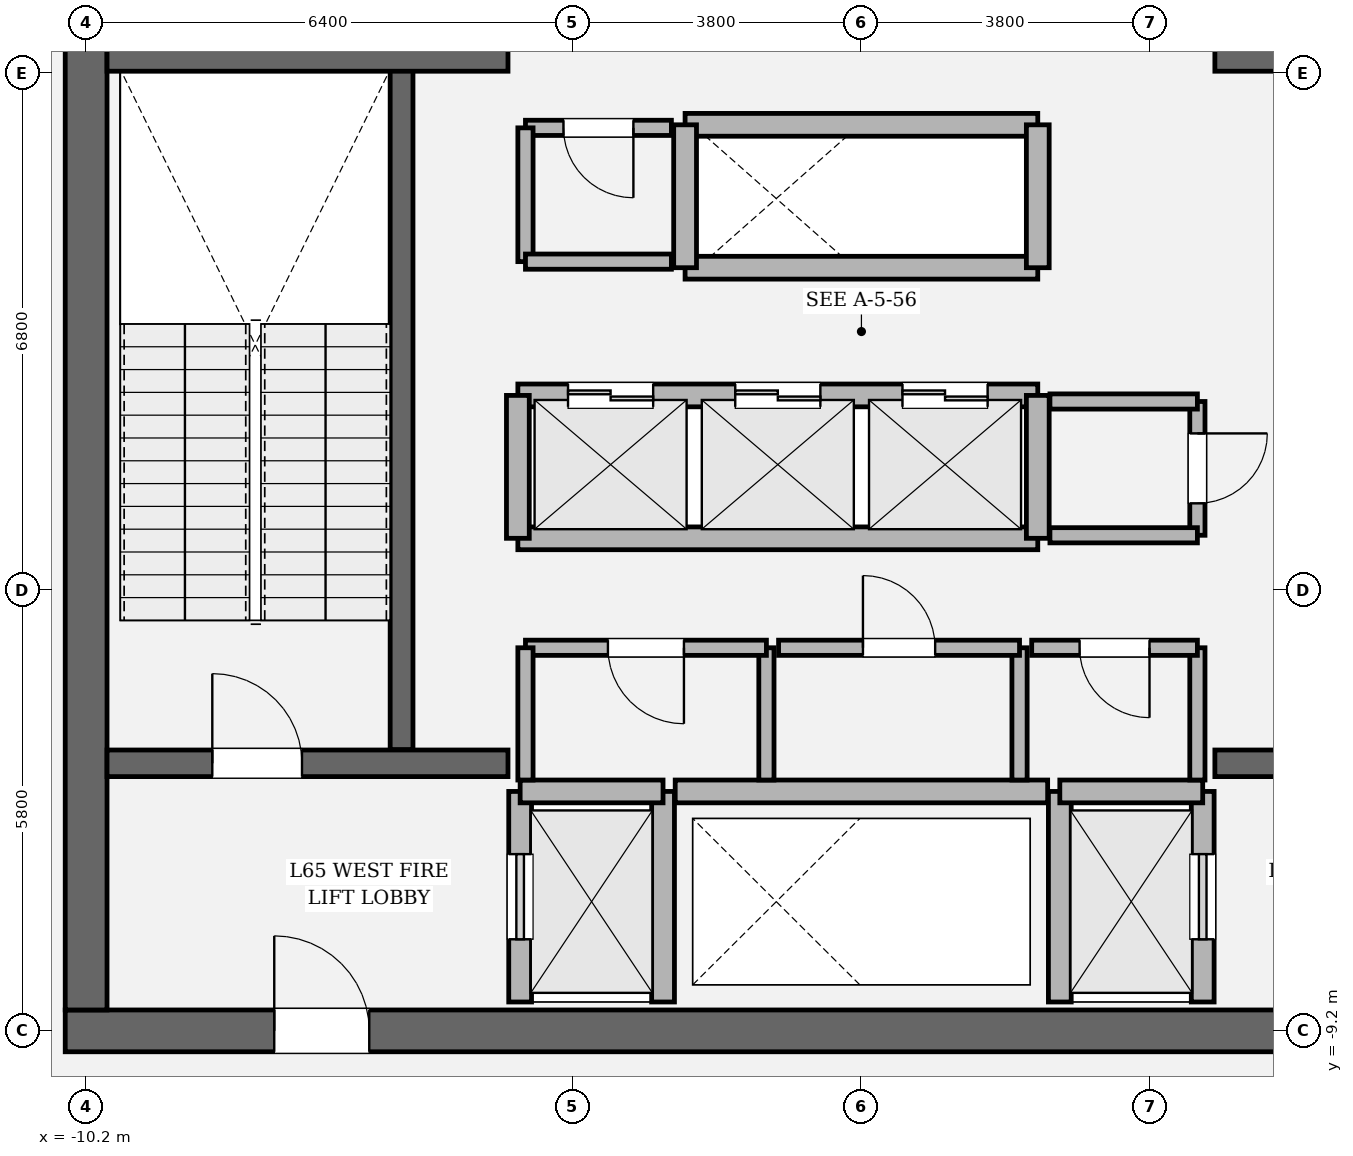
"""IFC4 building model, lengths in metres.
Left out: names, types, materials, properties, quantities, classifications, styles, units other than length and angle.
Written with IfcOpenShell. Run it as: python <this file> out.ifc"""

import sys

from ifc_helpers import new_model, si_unit, direction, frame, frame_2d, origin, place, context, subcontext, project, spatial, rectangle, extrude, element, fill, save


model = new_model("IFC4")
c1 = context("Model", 3, precision=1e-05, world=origin(), true_north=direction((0.0, 1.0)))
c2 = subcontext(c1, "Body", "Model", "MODEL_VIEW")
j1 = project(units=[si_unit("LENGTHUNIT", "METRE"), si_unit("PLANEANGLEUNIT", "RADIAN")], contexts=[c1])
p1 = place(None, origin())
s1 = spatial("IfcSite", under=j1, at=p1, CompositionType="ELEMENT")
p2 = place(p1, origin())
s2 = spatial("IfcBuilding", under=s1, at=p2, CompositionType="ELEMENT")
p3 = place(p2, frame((0.0, 0.0, 275.7)))
s3 = spatial("IfcBuildingStorey", under=s2, at=p3, CompositionType="ELEMENT", Elevation=275.7)
p4 = place(p3, frame((10.475, -9.2, 0.0), z_axis=(0.0, 0.0, 1.0), x_axis=(-1.0, 0.0, 0.0)))
e1 = element("IfcWall", 1, at=p4, inside=s3, PredefinedType="SHEAR", context=c2, shape_type="SweptSolid", body=[
    extrude(rectangle(XDim=20.95, YDim=0.55, at=frame_2d((10.475, 0.0))), origin(), (0.0, 0.0, 1.0), 4.05),
])
p5 = place(p4, frame((2.75, 0.0, 0.0)))
e2 = element("IfcOpeningElement", 2, at=p5, cuts=e1, PredefinedType="OPENING", context=c2, shape_type="SweptSolid", body=[
    extrude(rectangle(XDim=1.25, YDim=2.25, at=frame_2d((0.625, 1.125))), frame((0.0, 0.285, 0.0), z_axis=(0.0, -1.0, 0.0), x_axis=(1.0, 0.0, 0.0)), (0.0, 0.0, 1.0), 0.57),
])
p6 = place(p4, frame((16.95, 0.0, 0.0)))
e3 = element("IfcOpeningElement", 3, at=p6, cuts=e1, PredefinedType="OPENING", context=c2, shape_type="SweptSolid", body=[
    extrude(rectangle(XDim=1.25, YDim=2.25, at=frame_2d((0.625, 1.125))), frame((0.0, 0.285, 0.0), z_axis=(0.0, -1.0, 0.0), x_axis=(1.0, 0.0, 0.0)), (0.0, 0.0, 1.0), 0.57),
])
p7 = place(p3, frame((-10.2, -8.925, 0.0), z_axis=(0.0, 0.0, 1.0), x_axis=(0.0, 1.0, 0.0)))
e4 = element("IfcWall", 4, at=p7, inside=s3, PredefinedType="SHEAR", context=c2, shape_type="SweptSolid", body=[
    extrude(rectangle(XDim=17.85, YDim=0.55, at=frame_2d((8.925, 0.0))), origin(), (0.0, 0.0, 1.0), 4.05),
])
p8 = place(p7, frame((12.715, 0.0, 0.0)))
e5 = element("IfcOpeningElement", 5, at=p8, cuts=e4, PredefinedType="OPENING", context=c2, shape_type="SweptSolid", body=[
    extrude(rectangle(XDim=1.18, YDim=2.2, at=frame_2d((0.59, 1.1))), frame((0.0, 0.285, 0.0), z_axis=(0.0, -1.0, 0.0), x_axis=(1.0, 0.0, 0.0)), (0.0, 0.0, 1.0), 0.57),
])
p9 = place(p3, frame((-6.05, -5.5, 0.0), z_axis=(0.0, 0.0, 1.0), x_axis=(0.0, 1.0, 0.0)))
e6 = element("IfcWall", 6, at=p9, inside=s3, PredefinedType="SOLIDWALL", context=c2, shape_type="SweptSolid", body=[
    extrude(rectangle(XDim=8.95, YDim=0.3, at=frame_2d((4.475, 0.0))), origin(), (0.0, 0.0, 1.0), 4.05),
])
p10 = place(p3, frame((-9.925, -5.68, 0.0), z_axis=(0.0, 0.0, 1.0), x_axis=(1.0, 0.0, 0.0)))
e7 = element("IfcWall", 7, at=p10, inside=s3, PredefinedType="SOLIDWALL", context=c2, shape_type="SweptSolid", body=[
    extrude(rectangle(XDim=5.275, YDim=0.35, at=frame_2d((2.638, 0.0))), origin(), (0.0, 0.0, 1.0), 4.05),
])
p11 = place(p10, frame((1.385, 0.0, 0.0)))
e8 = element("IfcOpeningElement", 8, at=p11, cuts=e7, PredefinedType="OPENING", context=c2, shape_type="SweptSolid", body=[
    extrude(rectangle(XDim=1.18, YDim=2.2, at=frame_2d((0.59, 1.1))), frame((0.0, 0.185, 0.0), z_axis=(0.0, -1.0, 0.0), x_axis=(1.0, 0.0, 0.0)), (0.0, 0.0, 1.0), 0.37),
])
p12 = place(p3, frame((4.65, -5.68, 0.0), z_axis=(0.0, 0.0, 1.0), x_axis=(1.0, 0.0, 0.0)))
e9 = element("IfcWall", 9, at=p12, inside=s3, PredefinedType="SOLIDWALL", context=c2, shape_type="SweptSolid", body=[
    extrude(rectangle(XDim=5.275, YDim=0.35, at=frame_2d((2.638, 0.0))), origin(), (0.0, 0.0, 1.0), 4.05),
])
p13 = place(p12, frame((2.71, 0.0, 0.0)))
e10 = element("IfcOpeningElement", 10, at=p13, cuts=e9, PredefinedType="OPENING", context=c2, shape_type="SweptSolid", body=[
    extrude(rectangle(XDim=1.18, YDim=2.2, at=frame_2d((0.59, 1.1))), frame((0.0, 0.185, 0.0), z_axis=(0.0, -1.0, 0.0), x_axis=(1.0, 0.0, 0.0)), (0.0, 0.0, 1.0), 0.37),
])
for number, where, z_axis, x_axis in (
    (11, (-9.925, 3.6, 0.0), (0.0, 0.0, 1.0), (1.0, 0.0, 0.0)),
    (12, (4.65, 3.6, 0.0), (0.0, 0.0, 1.0), (1.0, 0.0, 0.0)),
):
    element("IfcWall", number, at=place(p3, frame(where, z_axis=z_axis, x_axis=x_axis)), inside=s3, PredefinedType="SOLIDWALL", context=c2, shape_type="SweptSolid", body=[
        extrude(rectangle(XDim=5.275, YDim=0.35, at=frame_2d((2.638, 0.0))), origin(), (0.0, 0.0, 1.0), 4.05),
    ])
p14 = place(p3, frame((-4.49, -8.82, 0.0), z_axis=(0.0, 0.0, 1.0), x_axis=(0.0, 1.0, 0.0)))
e13 = element("IfcWall", 13, at=p14, inside=s3, PredefinedType="SOLIDWALL", context=c2, shape_type="SweptSolid", body=[
    extrude(rectangle(XDim=2.77, YDim=0.3, at=frame_2d((1.385, 0.0))), origin(), (0.0, 0.0, 1.0), 3.85),
])
p15 = place(p14, frame((0.825, 0.0, 0.0)))
e14 = element("IfcOpeningElement", 14, at=p15, cuts=e13, PredefinedType="OPENING", context=c2, shape_type="SweptSolid", body=[
    extrude(rectangle(XDim=1.12, YDim=2.25, at=frame_2d((0.56, 1.125))), frame((0.0, 0.16, 0.0), z_axis=(0.0, -1.0, 0.0), x_axis=(1.0, 0.0, 0.0)), (0.0, 0.0, 1.0), 0.32),
])
p16 = place(p3, frame((-2.61, -8.82, 0.0), z_axis=(0.0, 0.0, 1.0), x_axis=(0.0, 1.0, 0.0)))
e15 = element("IfcWall", 15, at=p16, inside=s3, PredefinedType="SOLIDWALL", context=c2, shape_type="SweptSolid", body=[
    extrude(rectangle(XDim=2.77, YDim=0.3, at=frame_2d((1.385, 0.0))), origin(), (0.0, 0.0, 1.0), 3.85),
])
p17 = place(p3, frame((-4.49, -6.05, 0.0), z_axis=(0.0, 0.0, 1.0), x_axis=(1.0, 0.0, 0.0)))
e16 = element("IfcWall", 16, at=p17, inside=s3, PredefinedType="SOLIDWALL", context=c2, shape_type="SweptSolid", body=[
    extrude(rectangle(XDim=1.88, YDim=0.3, at=frame_2d((0.94, 0.0))), origin(), (0.0, 0.0, 1.0), 3.85),
])
p18 = place(p3, frame((4.49, -8.82, 0.0), z_axis=(0.0, 0.0, 1.0), x_axis=(0.0, 1.0, 0.0)))
e17 = element("IfcWall", 17, at=p18, inside=s3, PredefinedType="SOLIDWALL", context=c2, shape_type="SweptSolid", body=[
    extrude(rectangle(XDim=2.77, YDim=0.3, at=frame_2d((1.385, 0.0))), origin(), (0.0, 0.0, 1.0), 3.85),
])
p19 = place(p18, frame((0.825, 0.0, 0.0)))
e18 = element("IfcOpeningElement", 18, at=p19, cuts=e17, PredefinedType="OPENING", context=c2, shape_type="SweptSolid", body=[
    extrude(rectangle(XDim=1.12, YDim=2.25, at=frame_2d((0.56, 1.125))), frame((0.0, 0.16, 0.0), z_axis=(0.0, -1.0, 0.0), x_axis=(1.0, 0.0, 0.0)), (0.0, 0.0, 1.0), 0.32),
])
p20 = place(p3, frame((2.61, -8.82, 0.0), z_axis=(0.0, 0.0, 1.0), x_axis=(0.0, 1.0, 0.0)))
e19 = element("IfcWall", 19, at=p20, inside=s3, PredefinedType="SOLIDWALL", context=c2, shape_type="SweptSolid", body=[
    extrude(rectangle(XDim=2.77, YDim=0.3, at=frame_2d((1.385, 0.0))), origin(), (0.0, 0.0, 1.0), 3.85),
])
p21 = place(p3, frame((2.61, -6.05, 0.0), z_axis=(0.0, 0.0, 1.0), x_axis=(1.0, 0.0, 0.0)))
e20 = element("IfcWall", 20, at=p21, inside=s3, PredefinedType="SOLIDWALL", context=c2, shape_type="SweptSolid", body=[
    extrude(rectangle(XDim=1.88, YDim=0.3, at=frame_2d((0.94, 0.0))), origin(), (0.0, 0.0, 1.0), 3.85),
])
p22 = place(p3, frame((-4.52, -0.84, 0.0), z_axis=(0.0, 0.0, 1.0), x_axis=(1.0, 0.0, 0.0)))
e21 = element("IfcWall", 21, at=p22, inside=s3, PredefinedType="SOLIDWALL", context=c2, shape_type="SweptSolid", body=[
    extrude(rectangle(XDim=6.84, YDim=0.3, at=frame_2d((3.42, 0.0))), origin(), (0.0, 0.0, 1.0), 3.85),
])
p23 = place(p22, frame((0.66, 0.0, 0.0)))
e22 = element("IfcOpeningElement", 22, at=p23, cuts=e21, PredefinedType="OPENING", context=c2, shape_type="SweptSolid", body=[
    extrude(rectangle(XDim=1.12, YDim=2.25, at=frame_2d((0.56, 1.125))), frame((0.0, 0.16, 0.0), z_axis=(0.0, -1.0, 0.0), x_axis=(1.0, 0.0, 0.0)), (0.0, 0.0, 1.0), 0.32),
])
p24 = place(p22, frame((2.86, 0.0, 0.0)))
e23 = element("IfcOpeningElement", 23, at=p24, cuts=e21, PredefinedType="OPENING", context=c2, shape_type="SweptSolid", body=[
    extrude(rectangle(XDim=1.12, YDim=2.25, at=frame_2d((0.56, 1.125))), frame((0.0, 0.16, 0.0), z_axis=(0.0, -1.0, 0.0), x_axis=(1.0, 0.0, 0.0)), (0.0, 0.0, 1.0), 0.32),
])
p25 = place(p22, frame((5.06, 0.0, 0.0)))
e24 = element("IfcOpeningElement", 24, at=p25, cuts=e21, PredefinedType="OPENING", context=c2, shape_type="SweptSolid", body=[
    extrude(rectangle(XDim=1.12, YDim=2.25, at=frame_2d((0.56, 1.125))), frame((0.0, 0.16, 0.0), z_axis=(0.0, -1.0, 0.0), x_axis=(1.0, 0.0, 0.0)), (0.0, 0.0, 1.0), 0.32),
])
p26 = place(p3, frame((-4.52, -2.72, 0.0), z_axis=(0.0, 0.0, 1.0), x_axis=(1.0, 0.0, 0.0)))
e25 = element("IfcWall", 25, at=p26, inside=s3, PredefinedType="SOLIDWALL", context=c2, shape_type="SweptSolid", body=[
    extrude(rectangle(XDim=6.84, YDim=0.3, at=frame_2d((3.42, 0.0))), origin(), (0.0, 0.0, 1.0), 3.85),
])
for number, where, z_axis, x_axis in (
    (26, (-4.52, -2.72, 0.0), (0.0, 0.0, 1.0), (0.0, 1.0, 0.0)),
    (27, (2.32, -2.72, 0.0), (0.0, 0.0, 1.0), (0.0, 1.0, 0.0)),
):
    element("IfcWall", number, at=place(p3, frame(where, z_axis=z_axis, x_axis=x_axis)), inside=s3, PredefinedType="SOLIDWALL", context=c2, shape_type="SweptSolid", body=[
        extrude(rectangle(XDim=1.88, YDim=0.3, at=frame_2d((0.94, 0.0))), origin(), (0.0, 0.0, 1.0), 3.85),
    ])
for number, where, z_axis, x_axis in (
    (28, (-2.32, 0.84, 0.0), (0.0, 0.0, 1.0), (1.0, 0.0, 0.0)),
    (29, (-2.32, 2.72, 0.0), (0.0, 0.0, 1.0), (1.0, 0.0, 0.0)),
):
    element("IfcWall", number, at=place(p3, frame(where, z_axis=z_axis, x_axis=x_axis)), inside=s3, PredefinedType="SOLIDWALL", context=c2, shape_type="SweptSolid", body=[
        extrude(rectangle(XDim=4.64, YDim=0.3, at=frame_2d((2.32, 0.0))), origin(), (0.0, 0.0, 1.0), 3.85),
    ])
for number, where, z_axis, x_axis in (
    (30, (-2.32, 0.84, 0.0), (0.0, 0.0, 1.0), (0.0, 1.0, 0.0)),
    (31, (2.32, 0.84, 0.0), (0.0, 0.0, 1.0), (0.0, 1.0, 0.0)),
):
    element("IfcWall", number, at=place(p3, frame(where, z_axis=z_axis, x_axis=x_axis)), inside=s3, PredefinedType="SOLIDWALL", context=c2, shape_type="SweptSolid", body=[
        extrude(rectangle(XDim=1.88, YDim=0.3, at=frame_2d((0.94, 0.0))), origin(), (0.0, 0.0, 1.0), 3.85),
    ])
p27 = place(p3, frame((-2.45, -6.05, 0.0), z_axis=(0.0, 0.0, 1.0), x_axis=(1.0, 0.0, 0.0)))
e32 = element("IfcWall", 32, at=p27, inside=s3, PredefinedType="SOLIDWALL", context=c2, shape_type="SweptSolid", body=[
    extrude(rectangle(XDim=4.9, YDim=0.3, at=frame_2d((2.45, 0.0))), origin(), (0.0, 0.0, 1.0), 3.85),
])
p28 = place(p3, frame((-1.25, -5.9, 0.0), z_axis=(0.0, 0.0, 1.0), x_axis=(0.0, 1.0, 0.0)))
e33 = element("IfcWall", 33, at=p28, inside=s3, PredefinedType="SOLIDWALL", context=c2, shape_type="SweptSolid", body=[
    extrude(rectangle(XDim=1.74, YDim=0.2, at=frame_2d((0.87, 0.0))), origin(), (0.0, 0.0, 1.0), 3.85),
])
p29 = place(p3, frame((-1.25, -4.16, 0.0), z_axis=(0.0, 0.0, 1.0), x_axis=(-1.0, 0.0, 0.0)))
e34 = element("IfcWall", 34, at=p29, inside=s3, PredefinedType="SOLIDWALL", context=c2, shape_type="SweptSolid", body=[
    extrude(rectangle(XDim=3.17, YDim=0.2, at=frame_2d((1.585, 0.0))), origin(), (0.0, 0.0, 1.0), 3.85),
])
p30 = place(p29, frame((1.085, 0.0, 0.0)))
e35 = element("IfcOpeningElement", 35, at=p30, cuts=e34, PredefinedType="OPENING", context=c2, shape_type="SweptSolid", body=[
    extrude(rectangle(XDim=1.0, YDim=2.15, at=frame_2d((0.5, 1.075))), frame((0.0, 0.11, 0.0), z_axis=(0.0, -1.0, 0.0), x_axis=(1.0, 0.0, 0.0)), (0.0, 0.0, 1.0), 0.22),
])
for number, where, z_axis, x_axis in (
    (36, (-4.42, -4.16, 0.0), (0.0, 0.0, 1.0), (0.0, -1.0, 0.0)),
    (37, (2.08, -5.9, 0.0), (0.0, 0.0, 1.0), (0.0, 1.0, 0.0)),
):
    element("IfcWall", number, at=place(p3, frame(where, z_axis=z_axis, x_axis=x_axis)), inside=s3, PredefinedType="SOLIDWALL", context=c2, shape_type="SweptSolid", body=[
        extrude(rectangle(XDim=1.74, YDim=0.2, at=frame_2d((0.87, 0.0))), origin(), (0.0, 0.0, 1.0), 3.85),
    ])
p31 = place(p3, frame((2.08, -4.16, 0.0), z_axis=(0.0, 0.0, 1.0), x_axis=(-1.0, 0.0, 0.0)))
e38 = element("IfcWall", 38, at=p31, inside=s3, PredefinedType="SOLIDWALL", context=c2, shape_type="SweptSolid", body=[
    extrude(rectangle(XDim=3.17, YDim=0.2, at=frame_2d((1.585, 0.0))), origin(), (0.0, 0.0, 1.0), 3.85),
])
p32 = place(p31, frame((1.11, 0.0, 0.0)))
e39 = element("IfcOpeningElement", 39, at=p32, cuts=e38, PredefinedType="OPENING", context=c2, shape_type="SweptSolid", body=[
    extrude(rectangle(XDim=0.95, YDim=2.15, at=frame_2d((0.475, 1.075))), frame((0.0, 0.11, 0.0), z_axis=(0.0, -1.0, 0.0), x_axis=(1.0, 0.0, 0.0)), (0.0, 0.0, 1.0), 0.22),
])
p33 = place(p3, frame((4.42, -5.9, 0.0), z_axis=(0.0, 0.0, 1.0), x_axis=(0.0, 1.0, 0.0)))
e40 = element("IfcWall", 40, at=p33, inside=s3, PredefinedType="SOLIDWALL", context=c2, shape_type="SweptSolid", body=[
    extrude(rectangle(XDim=1.74, YDim=0.2, at=frame_2d((0.87, 0.0))), origin(), (0.0, 0.0, 1.0), 3.85),
])
p34 = place(p3, frame((4.42, -4.16, 0.0), z_axis=(0.0, 0.0, 1.0), x_axis=(-1.0, 0.0, 0.0)))
e41 = element("IfcWall", 41, at=p34, inside=s3, PredefinedType="SOLIDWALL", context=c2, shape_type="SweptSolid", body=[
    extrude(rectangle(XDim=2.18, YDim=0.2, at=frame_2d((1.09, 0.0))), origin(), (0.0, 0.0, 1.0), 3.85),
])
p35 = place(p34, frame((0.63, 0.0, 0.0)))
e42 = element("IfcOpeningElement", 42, at=p35, cuts=e41, PredefinedType="OPENING", context=c2, shape_type="SweptSolid", body=[
    extrude(rectangle(XDim=0.92, YDim=2.1, at=frame_2d((0.46, 1.05))), frame((0.0, 0.11, 0.0), z_axis=(0.0, -1.0, 0.0), x_axis=(1.0, 0.0, 0.0)), (0.0, 0.0, 1.0), 0.22),
])
p36 = place(p3, frame((4.42, -2.68, 0.0), z_axis=(0.0, 0.0, 1.0), x_axis=(0.0, 1.0, 0.0)))
e43 = element("IfcWall", 43, at=p36, inside=s3, PredefinedType="SOLIDWALL", context=c2, shape_type="SweptSolid", body=[
    extrude(rectangle(XDim=1.76, YDim=0.2, at=frame_2d((0.88, 0.0))), origin(), (0.0, 0.0, 1.0), 3.85),
])
p37 = place(p36, frame((0.42, 0.0, 0.0)))
e44 = element("IfcOpeningElement", 44, at=p37, cuts=e43, PredefinedType="OPENING", context=c2, shape_type="SweptSolid", body=[
    extrude(rectangle(XDim=0.92, YDim=2.1, at=frame_2d((0.46, 1.05))), frame((0.0, 0.11, 0.0), z_axis=(0.0, -1.0, 0.0), x_axis=(1.0, 0.0, 0.0)), (0.0, 0.0, 1.0), 0.22),
])
for number, where, z_axis, x_axis in (
    (45, (4.42, -0.92, 0.0), (0.0, 0.0, 1.0), (-1.0, 0.0, 0.0)),
    (46, (2.48, -2.68, 0.0), (0.0, 0.0, 1.0), (1.0, 0.0, 0.0)),
):
    element("IfcWall", number, at=place(p3, frame(where, z_axis=z_axis, x_axis=x_axis)), inside=s3, PredefinedType="SOLIDWALL", context=c2, shape_type="SweptSolid", body=[
        extrude(rectangle(XDim=1.94, YDim=0.2, at=frame_2d((0.97, 0.0))), origin(), (0.0, 0.0, 1.0), 3.85),
    ])
p38 = place(p3, frame((-2.5, 2.68, 0.0), z_axis=(0.0, 0.0, 1.0), x_axis=(-1.0, 0.0, 0.0)))
e47 = element("IfcWall", 47, at=p38, inside=s3, PredefinedType="SOLIDWALL", context=c2, shape_type="SweptSolid", body=[
    extrude(rectangle(XDim=1.92, YDim=0.2, at=frame_2d((0.96, 0.0))), origin(), (0.0, 0.0, 1.0), 3.85),
])
p39 = place(p38, frame((0.5, 0.0, 0.0)))
e48 = element("IfcOpeningElement", 48, at=p39, cuts=e47, PredefinedType="OPENING", context=c2, shape_type="SweptSolid", body=[
    extrude(rectangle(XDim=0.92, YDim=2.1, at=frame_2d((0.46, 1.05))), frame((0.0, 0.11, 0.0), z_axis=(0.0, -1.0, 0.0), x_axis=(1.0, 0.0, 0.0)), (0.0, 0.0, 1.0), 0.22),
])
p40 = place(p3, frame((-4.42, 2.68, 0.0), z_axis=(0.0, 0.0, 1.0), x_axis=(0.0, -1.0, 0.0)))
e49 = element("IfcWall", 49, at=p40, inside=s3, PredefinedType="SOLIDWALL", context=c2, shape_type="SweptSolid", body=[
    extrude(rectangle(XDim=1.76, YDim=0.2, at=frame_2d((0.88, 0.0))), origin(), (0.0, 0.0, 1.0), 3.85),
])
p41 = place(p3, frame((-4.42, 0.92, 0.0), z_axis=(0.0, 0.0, 1.0), x_axis=(1.0, 0.0, 0.0)))
e50 = element("IfcWall", 50, at=p41, inside=s3, PredefinedType="SOLIDWALL", context=c2, shape_type="SweptSolid", body=[
    extrude(rectangle(XDim=1.92, YDim=0.2, at=frame_2d((0.96, 0.0))), origin(), (0.0, 0.0, 1.0), 3.85),
])
p42 = place(p11, origin())
e51 = element("IfcDoor", 51, at=p42, inside=s3, OperationType="SINGLE_SWING_LEFT", PredefinedType="DOOR", context=c2, shape_type="SweptSolid", body=[
    extrude(rectangle(XDim=1.18, YDim=2.2, at=frame_2d((0.59, 1.1))), frame((0.0, 0.025, 0.0), z_axis=(0.0, -1.0, 0.0), x_axis=(1.0, 0.0, 0.0)), (0.0, 0.0, 1.0), 0.05),
])
fill(e8, e51)
p43 = place(p6, origin())
e52 = element("IfcDoor", 52, at=p43, inside=s3, OperationType="SINGLE_SWING_RIGHT", PredefinedType="DOOR", context=c2, shape_type="SweptSolid", body=[
    extrude(rectangle(XDim=1.25, YDim=2.25, at=frame_2d((0.625, 1.125))), frame((0.0, 0.025, 0.0), z_axis=(0.0, -1.0, 0.0), x_axis=(1.0, 0.0, 0.0)), (0.0, 0.0, 1.0), 0.05),
])
fill(e3, e52)
p44 = place(p15, origin())
e53 = element("IfcDoor", 53, at=p44, inside=s3, OperationType="SLIDING_TO_LEFT", PredefinedType="DOOR", context=c2, shape_type="SweptSolid", body=[
    extrude(rectangle(XDim=1.12, YDim=2.25, at=frame_2d((0.56, 1.125))), frame((0.0, 0.025, 0.0), z_axis=(0.0, -1.0, 0.0), x_axis=(1.0, 0.0, 0.0)), (0.0, 0.0, 1.0), 0.05),
])
fill(e14, e53)
p45 = place(p19, origin())
e54 = element("IfcDoor", 54, at=p45, inside=s3, OperationType="SLIDING_TO_RIGHT", PredefinedType="DOOR", context=c2, shape_type="SweptSolid", body=[
    extrude(rectangle(XDim=1.12, YDim=2.25, at=frame_2d((0.56, 1.125))), frame((0.0, 0.025, 0.0), z_axis=(0.0, -1.0, 0.0), x_axis=(1.0, 0.0, 0.0)), (0.0, 0.0, 1.0), 0.05),
])
fill(e18, e54)
p46 = place(p23, origin())
e55 = element("IfcDoor", 55, at=p46, inside=s3, OperationType="DOUBLE_DOOR_SLIDING", PredefinedType="DOOR", context=c2, shape_type="SweptSolid", body=[
    extrude(rectangle(XDim=1.12, YDim=2.25, at=frame_2d((0.56, 1.125))), frame((0.0, 0.025, 0.0), z_axis=(0.0, -1.0, 0.0), x_axis=(1.0, 0.0, 0.0)), (0.0, 0.0, 1.0), 0.05),
])
fill(e22, e55)
p47 = place(p24, origin())
e56 = element("IfcDoor", 56, at=p47, inside=s3, OperationType="DOUBLE_DOOR_SLIDING", PredefinedType="DOOR", context=c2, shape_type="SweptSolid", body=[
    extrude(rectangle(XDim=1.12, YDim=2.25, at=frame_2d((0.56, 1.125))), frame((0.0, 0.025, 0.0), z_axis=(0.0, -1.0, 0.0), x_axis=(1.0, 0.0, 0.0)), (0.0, 0.0, 1.0), 0.05),
])
fill(e23, e56)
p48 = place(p25, origin())
e57 = element("IfcDoor", 57, at=p48, inside=s3, OperationType="DOUBLE_DOOR_SLIDING", PredefinedType="DOOR", context=c2, shape_type="SweptSolid", body=[
    extrude(rectangle(XDim=1.12, YDim=2.25, at=frame_2d((0.56, 1.125))), frame((0.0, 0.025, 0.0), z_axis=(0.0, -1.0, 0.0), x_axis=(1.0, 0.0, 0.0)), (0.0, 0.0, 1.0), 0.05),
])
fill(e24, e57)
p49 = place(p30, origin())
e58 = element("IfcDoor", 58, at=p49, inside=s3, OperationType="SINGLE_SWING_LEFT", PredefinedType="DOOR", context=c2, shape_type="SweptSolid", body=[
    extrude(rectangle(XDim=1.0, YDim=2.15, at=frame_2d((0.5, 1.075))), frame((0.0, 0.025, 0.0), z_axis=(0.0, -1.0, 0.0), x_axis=(1.0, 0.0, 0.0)), (0.0, 0.0, 1.0), 0.05),
])
fill(e35, e58)
p50 = place(p32, origin())
e59 = element("IfcDoor", 59, at=p50, inside=s3, OperationType="SINGLE_SWING_RIGHT", PredefinedType="DOOR", context=c2, shape_type="SweptSolid", body=[
    extrude(rectangle(XDim=0.95, YDim=2.15, at=frame_2d((0.475, 1.075))), frame((0.0, 0.025, 0.0), z_axis=(0.0, -1.0, 0.0), x_axis=(1.0, 0.0, 0.0)), (0.0, 0.0, 1.0), 0.05),
])
fill(e39, e59)
p51 = place(p35, origin())
e60 = element("IfcDoor", 60, at=p51, inside=s3, OperationType="SINGLE_SWING_LEFT", PredefinedType="DOOR", context=c2, shape_type="SweptSolid", body=[
    extrude(rectangle(XDim=0.92, YDim=2.1, at=frame_2d((0.46, 1.05))), frame((0.0, 0.025, 0.0), z_axis=(0.0, -1.0, 0.0), x_axis=(1.0, 0.0, 0.0)), (0.0, 0.0, 1.0), 0.05),
])
fill(e42, e60)
p52 = place(p37, origin())
e61 = element("IfcDoor", 61, at=p52, inside=s3, OperationType="SINGLE_SWING_RIGHT", PredefinedType="DOOR", context=c2, shape_type="SweptSolid", body=[
    extrude(rectangle(XDim=0.92, YDim=2.1, at=frame_2d((0.46, 1.05))), frame((0.0, 0.025, 0.0), z_axis=(0.0, -1.0, 0.0), x_axis=(1.0, 0.0, 0.0)), (0.0, 0.0, 1.0), 0.05),
])
fill(e44, e61)
p53 = place(p39, origin())
e62 = element("IfcDoor", 62, at=p53, inside=s3, OperationType="SINGLE_SWING_LEFT", PredefinedType="DOOR", context=c2, shape_type="SweptSolid", body=[
    extrude(rectangle(XDim=0.92, YDim=2.1, at=frame_2d((0.46, 1.05))), frame((0.0, 0.025, 0.0), z_axis=(0.0, -1.0, 0.0), x_axis=(1.0, 0.0, 0.0)), (0.0, 0.0, 1.0), 0.05),
])
fill(e48, e62)
save(model, sys.argv[1])
